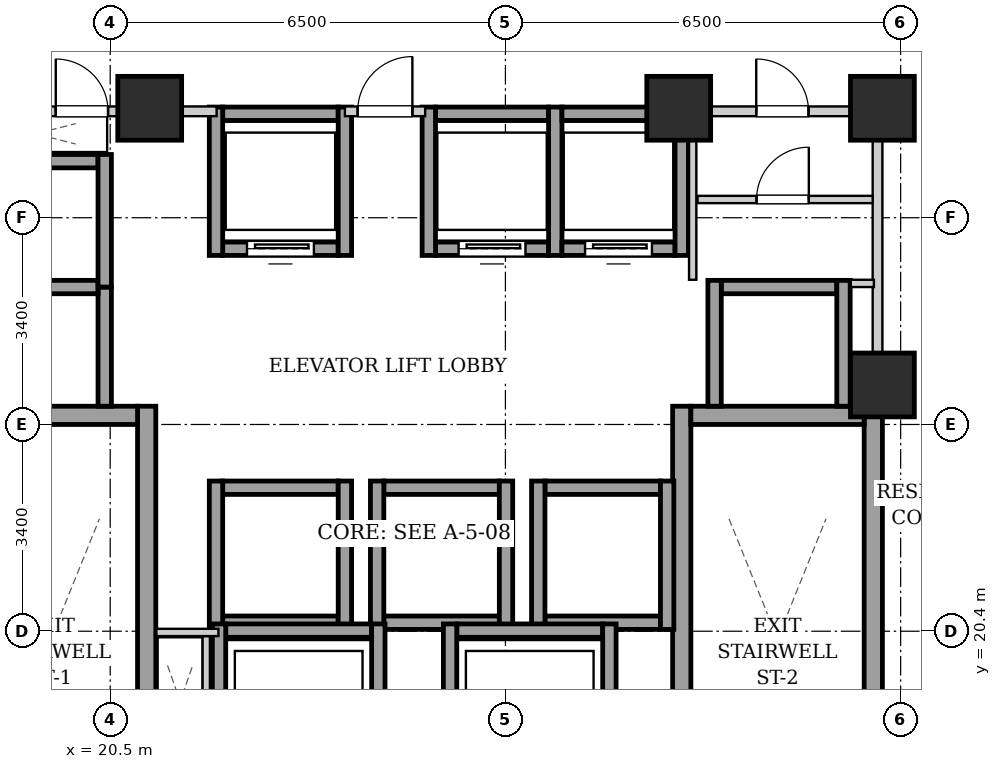
"""IFC4 building model, lengths in metres.
Left out: names, types, materials, properties, quantities, classifications, styles, units other than length and angle.
Written with IfcOpenShell. Run it as: python <this file> out.ifc"""

import sys

from ifc_helpers import new_model, si_unit, direction, frame, frame_2d, origin, origin_2d, place, context, subcontext, project, spatial, rectangle, extrude, element, fill, save


model = new_model("IFC4")
c1 = context("Model", 3, precision=1e-05, world=origin(), true_north=direction((0.0, 1.0)))
c2 = subcontext(c1, "Body", "Model", "MODEL_VIEW")
j1 = project(units=[si_unit("LENGTHUNIT", "METRE"), si_unit("PLANEANGLEUNIT", "RADIAN")], contexts=[c1])
p1 = place(None, origin())
s1 = spatial("IfcSite", under=j1, at=p1, CompositionType="ELEMENT")
p2 = place(p1, origin())
s2 = spatial("IfcBuilding", under=s1, at=p2, CompositionType="ELEMENT")
p3 = place(p2, frame((0.0, 0.0, 97.5)))
s3 = spatial("IfcBuildingStorey", under=s2, at=p3, CompositionType="ELEMENT", Elevation=97.5)
for number, where, z_axis, x_axis in (
    (1, (21.15, 29.0, 0.0), (0.0, 0.0, 1.0), (1.0, 0.0, 0.0)),
    (2, (29.85, 29.0, 0.0), (0.0, 0.0, 1.0), (1.0, 0.0, 0.0)),
    (3, (33.2, 29.0, 0.0), (0.0, 0.0, 1.0), (1.0, 0.0, 0.0)),
    (4, (33.2, 24.45, 0.0), (0.0, 0.0, 1.0), (1.0, 0.0, 0.0)),
):
    element("IfcColumn", number, at=place(p3, frame(where, z_axis=z_axis, x_axis=x_axis)), inside=s3, PredefinedType="COLUMN", context=c2, shape_type="SweptSolid", body=[
        extrude(rectangle(XDim=1.05, YDim=1.05, at=origin_2d()), origin(), (0.0, 0.0, 1.0), 3.2),
    ])
p4 = place(p3, frame((21.1, 15.1, 0.0), z_axis=(0.0, 0.0, 1.0), x_axis=(0.0, 1.0, 0.0)))
e5 = element("IfcWall", 5, at=p4, inside=s3, PredefinedType="SHEAR", context=c2, shape_type="SweptSolid", body=[
    extrude(rectangle(XDim=9.0, YDim=0.3, at=frame_2d((4.5, 0.0))), origin(), (0.0, 0.0, 1.0), 2.94),
])
p5 = place(p3, frame((18.1, 23.95, 0.0), z_axis=(0.0, 0.0, 1.0), x_axis=(1.0, 0.0, 0.0)))
e6 = element("IfcWall", 6, at=p5, inside=s3, PredefinedType="SHEAR", context=c2, shape_type="SweptSolid", body=[
    extrude(rectangle(XDim=2.85, YDim=0.3, at=frame_2d((1.425, 0.0))), origin(), (0.0, 0.0, 1.0), 2.94),
])
for number, where, z_axis, x_axis in (
    (7, (29.9, 15.1, 0.0), (0.0, 0.0, 1.0), (0.0, 1.0, 0.0)),
    (8, (33.05, 15.1, 0.0), (0.0, 0.0, 1.0), (0.0, 1.0, 0.0)),
):
    element("IfcWall", number, at=place(p3, frame(where, z_axis=z_axis, x_axis=x_axis)), inside=s3, PredefinedType="SHEAR", context=c2, shape_type="SweptSolid", body=[
        extrude(rectangle(XDim=9.0, YDim=0.3, at=frame_2d((4.5, 0.0))), origin(), (0.0, 0.0, 1.0), 2.94),
    ])
p6 = place(p3, frame((30.05, 23.95, 0.0), z_axis=(0.0, 0.0, 1.0), x_axis=(1.0, 0.0, 0.0)))
e9 = element("IfcWall", 9, at=p6, inside=s3, PredefinedType="SHEAR", context=c2, shape_type="SweptSolid", body=[
    extrude(rectangle(XDim=2.85, YDim=0.3, at=frame_2d((1.425, 0.0))), origin(), (0.0, 0.0, 1.0), 2.94),
])
p7 = place(p3, frame((22.35, 26.69, 0.0), z_axis=(0.0, 0.0, 1.0), x_axis=(1.0, 0.0, 0.0)))
e10 = element("IfcWall", 10, at=p7, inside=s3, PredefinedType="SHEAR", context=c2, shape_type="SweptSolid", body=[
    extrude(rectangle(XDim=1.9, YDim=0.22, at=frame_2d((0.95, 0.0))), origin(), (0.0, 0.0, 1.0), 2.94),
])
p8 = place(p7, frame((0.4, 0.0, 0.0)))
e11 = element("IfcOpeningElement", 11, at=p8, cuts=e10, PredefinedType="OPENING", context=c2, shape_type="SweptSolid", body=[
    extrude(rectangle(XDim=1.1, YDim=2.15, at=frame_2d((0.55, 1.075))), frame((0.0, 0.12, 0.0), z_axis=(0.0, -1.0, 0.0), x_axis=(1.0, 0.0, 0.0)), (0.0, 0.0, 1.0), 0.24),
])
p9 = place(p3, frame((22.35, 28.91, 0.0), z_axis=(0.0, 0.0, 1.0), x_axis=(1.0, 0.0, 0.0)))
e12 = element("IfcWall", 12, at=p9, inside=s3, PredefinedType="SHEAR", context=c2, shape_type="SweptSolid", body=[
    extrude(rectangle(XDim=1.9, YDim=0.22, at=frame_2d((0.95, 0.0))), origin(), (0.0, 0.0, 1.0), 2.94),
])
for number, where, z_axis, x_axis in (
    (13, (22.24, 26.58, 0.0), (0.0, 0.0, 1.0), (0.0, 1.0, 0.0)),
    (14, (24.36, 26.58, 0.0), (0.0, 0.0, 1.0), (0.0, 1.0, 0.0)),
):
    element("IfcWall", number, at=place(p3, frame(where, z_axis=z_axis, x_axis=x_axis)), inside=s3, PredefinedType="SHEAR", context=c2, shape_type="SweptSolid", body=[
        extrude(rectangle(XDim=2.44, YDim=0.22, at=frame_2d((1.22, 0.0))), origin(), (0.0, 0.0, 1.0), 2.94),
    ])
p10 = place(p3, frame((25.85, 26.69, 0.0), z_axis=(0.0, 0.0, 1.0), x_axis=(1.0, 0.0, 0.0)))
e15 = element("IfcWall", 15, at=p10, inside=s3, PredefinedType="SHEAR", context=c2, shape_type="SweptSolid", body=[
    extrude(rectangle(XDim=1.86, YDim=0.22, at=frame_2d((0.93, 0.0))), origin(), (0.0, 0.0, 1.0), 2.94),
])
p11 = place(p10, frame((0.38, 0.0, 0.0)))
e16 = element("IfcOpeningElement", 16, at=p11, cuts=e15, PredefinedType="OPENING", context=c2, shape_type="SweptSolid", body=[
    extrude(rectangle(XDim=1.1, YDim=2.15, at=frame_2d((0.55, 1.075))), frame((0.0, 0.12, 0.0), z_axis=(0.0, -1.0, 0.0), x_axis=(1.0, 0.0, 0.0)), (0.0, 0.0, 1.0), 0.24),
])
p12 = place(p3, frame((25.85, 28.91, 0.0), z_axis=(0.0, 0.0, 1.0), x_axis=(1.0, 0.0, 0.0)))
e17 = element("IfcWall", 17, at=p12, inside=s3, PredefinedType="SHEAR", context=c2, shape_type="SweptSolid", body=[
    extrude(rectangle(XDim=1.86, YDim=0.22, at=frame_2d((0.93, 0.0))), origin(), (0.0, 0.0, 1.0), 2.94),
])
for number, where, z_axis, x_axis in (
    (18, (25.74, 26.58, 0.0), (0.0, 0.0, 1.0), (0.0, 1.0, 0.0)),
    (19, (27.82, 26.58, 0.0), (0.0, 0.0, 1.0), (0.0, 1.0, 0.0)),
):
    element("IfcWall", number, at=place(p3, frame(where, z_axis=z_axis, x_axis=x_axis)), inside=s3, PredefinedType="SHEAR", context=c2, shape_type="SweptSolid", body=[
        extrude(rectangle(XDim=2.44, YDim=0.22, at=frame_2d((1.22, 0.0))), origin(), (0.0, 0.0, 1.0), 2.94),
    ])
p13 = place(p3, frame((27.93, 26.69, 0.0), z_axis=(0.0, 0.0, 1.0), x_axis=(1.0, 0.0, 0.0)))
e20 = element("IfcWall", 20, at=p13, inside=s3, PredefinedType="SHEAR", context=c2, shape_type="SweptSolid", body=[
    extrude(rectangle(XDim=1.86, YDim=0.22, at=frame_2d((0.93, 0.0))), origin(), (0.0, 0.0, 1.0), 2.94),
])
p14 = place(p13, frame((0.38, 0.0, 0.0)))
e21 = element("IfcOpeningElement", 21, at=p14, cuts=e20, PredefinedType="OPENING", context=c2, shape_type="SweptSolid", body=[
    extrude(rectangle(XDim=1.1, YDim=2.15, at=frame_2d((0.55, 1.075))), frame((0.0, 0.12, 0.0), z_axis=(0.0, -1.0, 0.0), x_axis=(1.0, 0.0, 0.0)), (0.0, 0.0, 1.0), 0.24),
])
p15 = place(p3, frame((27.93, 28.91, 0.0), z_axis=(0.0, 0.0, 1.0), x_axis=(1.0, 0.0, 0.0)))
e22 = element("IfcWall", 22, at=p15, inside=s3, PredefinedType="SHEAR", context=c2, shape_type="SweptSolid", body=[
    extrude(rectangle(XDim=1.86, YDim=0.22, at=frame_2d((0.93, 0.0))), origin(), (0.0, 0.0, 1.0), 2.94),
])
p16 = place(p3, frame((29.9, 26.58, 0.0), z_axis=(0.0, 0.0, 1.0), x_axis=(0.0, 1.0, 0.0)))
e23 = element("IfcWall", 23, at=p16, inside=s3, PredefinedType="SHEAR", context=c2, shape_type="SweptSolid", body=[
    extrude(rectangle(XDim=2.44, YDim=0.22, at=frame_2d((1.22, 0.0))), origin(), (0.0, 0.0, 1.0), 2.94),
])
for number, where, z_axis, x_axis in (
    (24, (22.35, 20.54, 0.0), (0.0, 0.0, 1.0), (1.0, 0.0, 0.0)),
    (25, (22.35, 22.76, 0.0), (0.0, 0.0, 1.0), (1.0, 0.0, 0.0)),
):
    element("IfcWall", number, at=place(p3, frame(where, z_axis=z_axis, x_axis=x_axis)), inside=s3, PredefinedType="SHEAR", context=c2, shape_type="SweptSolid", body=[
        extrude(rectangle(XDim=1.9, YDim=0.22, at=frame_2d((0.95, 0.0))), origin(), (0.0, 0.0, 1.0), 2.94),
    ])
for number, where, z_axis, x_axis in (
    (26, (22.24, 20.43, 0.0), (0.0, 0.0, 1.0), (0.0, 1.0, 0.0)),
    (27, (24.36, 20.43, 0.0), (0.0, 0.0, 1.0), (0.0, 1.0, 0.0)),
):
    element("IfcWall", number, at=place(p3, frame(where, z_axis=z_axis, x_axis=x_axis)), inside=s3, PredefinedType="SHEAR", context=c2, shape_type="SweptSolid", body=[
        extrude(rectangle(XDim=2.44, YDim=0.22, at=frame_2d((1.22, 0.0))), origin(), (0.0, 0.0, 1.0), 2.94),
    ])
for number, where, z_axis, x_axis in (
    (28, (25.0, 20.54, 0.0), (0.0, 0.0, 1.0), (1.0, 0.0, 0.0)),
    (29, (25.0, 22.76, 0.0), (0.0, 0.0, 1.0), (1.0, 0.0, 0.0)),
):
    element("IfcWall", number, at=place(p3, frame(where, z_axis=z_axis, x_axis=x_axis)), inside=s3, PredefinedType="SHEAR", context=c2, shape_type="SweptSolid", body=[
        extrude(rectangle(XDim=1.9, YDim=0.22, at=frame_2d((0.95, 0.0))), origin(), (0.0, 0.0, 1.0), 2.94),
    ])
for number, where, z_axis, x_axis in (
    (30, (24.89, 20.43, 0.0), (0.0, 0.0, 1.0), (0.0, 1.0, 0.0)),
    (31, (27.01, 20.43, 0.0), (0.0, 0.0, 1.0), (0.0, 1.0, 0.0)),
):
    element("IfcWall", number, at=place(p3, frame(where, z_axis=z_axis, x_axis=x_axis)), inside=s3, PredefinedType="SHEAR", context=c2, shape_type="SweptSolid", body=[
        extrude(rectangle(XDim=2.44, YDim=0.22, at=frame_2d((1.22, 0.0))), origin(), (0.0, 0.0, 1.0), 2.94),
    ])
for number, where, z_axis, x_axis in (
    (32, (27.65, 20.54, 0.0), (0.0, 0.0, 1.0), (1.0, 0.0, 0.0)),
    (33, (27.65, 22.76, 0.0), (0.0, 0.0, 1.0), (1.0, 0.0, 0.0)),
):
    element("IfcWall", number, at=place(p3, frame(where, z_axis=z_axis, x_axis=x_axis)), inside=s3, PredefinedType="SHEAR", context=c2, shape_type="SweptSolid", body=[
        extrude(rectangle(XDim=1.9, YDim=0.22, at=frame_2d((0.95, 0.0))), origin(), (0.0, 0.0, 1.0), 2.94),
    ])
for number, where, z_axis, x_axis in (
    (34, (27.54, 20.43, 0.0), (0.0, 0.0, 1.0), (0.0, 1.0, 0.0)),
    (35, (29.66, 20.43, 0.0), (0.0, 0.0, 1.0), (0.0, 1.0, 0.0)),
):
    element("IfcWall", number, at=place(p3, frame(where, z_axis=z_axis, x_axis=x_axis)), inside=s3, PredefinedType="SHEAR", context=c2, shape_type="SweptSolid", body=[
        extrude(rectangle(XDim=2.44, YDim=0.22, at=frame_2d((1.22, 0.0))), origin(), (0.0, 0.0, 1.0), 2.94),
    ])
p17 = place(p3, frame((20.41, 24.1, 0.0), z_axis=(0.0, 0.0, 1.0), x_axis=(0.0, 1.0, 0.0)))
e36 = element("IfcWall", 36, at=p17, inside=s3, PredefinedType="SHEAR", context=c2, shape_type="SweptSolid", body=[
    extrude(rectangle(XDim=1.96, YDim=0.22, at=frame_2d((0.98, 0.0))), origin(), (0.0, 0.0, 1.0), 2.94),
])
for number, where, z_axis, x_axis in (
    (37, (18.4, 26.06, 0.0), (0.0, 0.0, 1.0), (1.0, 0.0, 0.0)),
    (38, (18.4, 28.13, 0.0), (0.0, 0.0, 1.0), (1.0, 0.0, 0.0)),
):
    element("IfcWall", number, at=place(p3, frame(where, z_axis=z_axis, x_axis=x_axis)), inside=s3, PredefinedType="SHEAR", context=c2, shape_type="SweptSolid", body=[
        extrude(rectangle(XDim=1.9, YDim=0.22, at=frame_2d((0.95, 0.0))), origin(), (0.0, 0.0, 1.0), 2.94),
    ])
p18 = place(p3, frame((20.41, 26.06, 0.0), z_axis=(0.0, 0.0, 1.0), x_axis=(0.0, 1.0, 0.0)))
e39 = element("IfcWall", 39, at=p18, inside=s3, PredefinedType="SHEAR", context=c2, shape_type="SweptSolid", body=[
    extrude(rectangle(XDim=2.18, YDim=0.22, at=frame_2d((1.09, 0.0))), origin(), (0.0, 0.0, 1.0), 2.94),
])
p19 = place(p3, frame((30.55, 26.06, 0.0), z_axis=(0.0, 0.0, 1.0), x_axis=(1.0, 0.0, 0.0)))
e40 = element("IfcWall", 40, at=p19, inside=s3, PredefinedType="SHEAR", context=c2, shape_type="SweptSolid", body=[
    extrude(rectangle(XDim=1.9, YDim=0.22, at=frame_2d((0.95, 0.0))), origin(), (0.0, 0.0, 1.0), 2.94),
])
for number, where, z_axis, x_axis in (
    (41, (30.44, 24.1, 0.0), (0.0, 0.0, 1.0), (0.0, 1.0, 0.0)),
    (42, (32.56, 24.1, 0.0), (0.0, 0.0, 1.0), (0.0, 1.0, 0.0)),
):
    element("IfcWall", number, at=place(p3, frame(where, z_axis=z_axis, x_axis=x_axis)), inside=s3, PredefinedType="SHEAR", context=c2, shape_type="SweptSolid", body=[
        extrude(rectangle(XDim=2.07, YDim=0.22, at=frame_2d((1.035, 0.0))), origin(), (0.0, 0.0, 1.0), 2.94),
    ])
p20 = place(p3, frame((22.4, 20.41, 0.0), z_axis=(0.0, 0.0, 1.0), x_axis=(1.0, 0.0, 0.0)))
e43 = element("IfcWall", 43, at=p20, inside=s3, PredefinedType="SHEAR", context=c2, shape_type="SweptSolid", body=[
    extrude(rectangle(XDim=2.4, YDim=0.22, at=frame_2d((1.2, 0.0))), origin(), (0.0, 0.0, 1.0), 2.94),
])
for number, where, z_axis, x_axis in (
    (44, (22.29, 17.98, 0.0), (0.0, 0.0, 1.0), (0.0, 1.0, 0.0)),
    (45, (24.91, 17.98, 0.0), (0.0, 0.0, 1.0), (0.0, 1.0, 0.0)),
):
    element("IfcWall", number, at=place(p3, frame(where, z_axis=z_axis, x_axis=x_axis)), inside=s3, PredefinedType="SHEAR", context=c2, shape_type="SweptSolid", body=[
        extrude(rectangle(XDim=2.54, YDim=0.22, at=frame_2d((1.27, 0.0))), origin(), (0.0, 0.0, 1.0), 2.94),
    ])
p21 = place(p3, frame((26.2, 20.41, 0.0), z_axis=(0.0, 0.0, 1.0), x_axis=(1.0, 0.0, 0.0)))
e46 = element("IfcWall", 46, at=p21, inside=s3, PredefinedType="SHEAR", context=c2, shape_type="SweptSolid", body=[
    extrude(rectangle(XDim=2.4, YDim=0.22, at=frame_2d((1.2, 0.0))), origin(), (0.0, 0.0, 1.0), 2.94),
])
for number, where, z_axis, x_axis in (
    (47, (26.09, 17.98, 0.0), (0.0, 0.0, 1.0), (0.0, 1.0, 0.0)),
    (48, (28.71, 17.98, 0.0), (0.0, 0.0, 1.0), (0.0, 1.0, 0.0)),
):
    element("IfcWall", number, at=place(p3, frame(where, z_axis=z_axis, x_axis=x_axis)), inside=s3, PredefinedType="SHEAR", context=c2, shape_type="SweptSolid", body=[
        extrude(rectangle(XDim=2.54, YDim=0.22, at=frame_2d((1.27, 0.0))), origin(), (0.0, 0.0, 1.0), 2.94),
    ])
p22 = place(p3, frame((33.12, 24.12, 0.0), z_axis=(0.0, 0.0, 1.0), x_axis=(0.0, 1.0, 0.0)))
e49 = element("IfcWall", 49, at=p22, inside=s3, PredefinedType="PARTITIONING", context=c2, shape_type="SweptSolid", body=[
    extrude(rectangle(XDim=4.76, YDim=0.16, at=frame_2d((2.38, 0.0))), origin(), (0.0, 0.0, 1.0), 2.275),
])
p23 = place(p3, frame((24.36, 28.95, 0.0), z_axis=(0.0, 0.0, 1.0), x_axis=(1.0, 0.0, 0.0)))
e50 = element("IfcWall", 50, at=p23, inside=s3, PredefinedType="PARTITIONING", context=c2, shape_type="SweptSolid", body=[
    extrude(rectangle(XDim=1.32, YDim=0.16, at=frame_2d((0.66, 0.0))), origin(), (0.0, 0.0, 1.0), 2.313),
])
p24 = place(p23, frame((0.21, 0.0, 0.0)))
e51 = element("IfcOpeningElement", 51, at=p24, cuts=e50, PredefinedType="OPENING", context=c2, shape_type="SweptSolid", body=[
    extrude(rectangle(XDim=0.9, YDim=2.05, at=frame_2d((0.45, 1.025))), frame((0.0, 0.09, 0.0), z_axis=(0.0, -1.0, 0.0), x_axis=(1.0, 0.0, 0.0)), (0.0, 0.0, 1.0), 0.18),
])
p25 = place(p3, frame((17.96, 28.95, 0.0), z_axis=(0.0, 0.0, 1.0), x_axis=(1.0, 0.0, 0.0)))
e52 = element("IfcWall", 52, at=p25, inside=s3, PredefinedType="PARTITIONING", context=c2, shape_type="SweptSolid", body=[
    extrude(rectangle(XDim=4.29, YDim=0.16, at=frame_2d((2.145, 0.0))), origin(), (0.0, 0.0, 1.0), 2.313),
])
p26 = place(p25, frame((1.645, 0.0, 0.0)))
e53 = element("IfcOpeningElement", 53, at=p26, cuts=e52, PredefinedType="OPENING", context=c2, shape_type="SweptSolid", body=[
    extrude(rectangle(XDim=0.86, YDim=2.05, at=frame_2d((0.43, 1.025))), frame((0.0, 0.09, 0.0), z_axis=(0.0, -1.0, 0.0), x_axis=(1.0, 0.0, 0.0)), (0.0, 0.0, 1.0), 0.18),
])
p27 = place(p3, frame((22.08, 18.2, 0.0), z_axis=(0.0, 0.0, 1.0), x_axis=(0.0, 1.0, 0.0)))
e54 = element("IfcWall", 54, at=p27, inside=s3, PredefinedType="PARTITIONING", context=c2, shape_type="SweptSolid", body=[
    extrude(rectangle(XDim=2.12, YDim=0.12, at=frame_2d((1.06, 0.0))), origin(), (0.0, 0.0, 1.0), 2.94),
])
p28 = place(p3, frame((22.28, 20.38, 0.0), z_axis=(0.0, 0.0, 1.0), x_axis=(-1.0, 0.0, 0.0)))
e55 = element("IfcWall", 55, at=p28, inside=s3, PredefinedType="PARTITIONING", context=c2, shape_type="SweptSolid", body=[
    extrude(rectangle(XDim=1.02, YDim=0.12, at=frame_2d((0.51, 0.0))), origin(), (0.0, 0.0, 1.0), 2.94),
])
p29 = place(p3, frame((30.08, 26.18, 0.0), z_axis=(0.0, 0.0, 1.0), x_axis=(0.0, 1.0, 0.0)))
e56 = element("IfcWall", 56, at=p29, inside=s3, PredefinedType="PARTITIONING", context=c2, shape_type="SweptSolid", body=[
    extrude(rectangle(XDim=2.68, YDim=0.12, at=frame_2d((1.34, 0.0))), origin(), (0.0, 0.0, 1.0), 2.94),
])
p30 = place(p3, frame((32.68, 26.12, 0.0), z_axis=(0.0, 0.0, 1.0), x_axis=(1.0, 0.0, 0.0)))
e57 = element("IfcWall", 57, at=p30, inside=s3, PredefinedType="PARTITIONING", context=c2, shape_type="SweptSolid", body=[
    extrude(rectangle(XDim=0.38, YDim=0.12, at=frame_2d((0.19, 0.0))), origin(), (0.0, 0.0, 1.0), 2.94),
])
p31 = place(p3, frame((30.16, 27.5, 0.0), z_axis=(0.0, 0.0, 1.0), x_axis=(1.0, 0.0, 0.0)))
e58 = element("IfcWall", 58, at=p31, inside=s3, PredefinedType="PARTITIONING", context=c2, shape_type="SweptSolid", body=[
    extrude(rectangle(XDim=2.88, YDim=0.12, at=frame_2d((1.44, 0.0))), origin(), (0.0, 0.0, 1.0), 2.94),
])
p32 = place(p31, frame((0.97, 0.0, 0.0)))
e59 = element("IfcOpeningElement", 59, at=p32, cuts=e58, PredefinedType="OPENING", context=c2, shape_type="SweptSolid", body=[
    extrude(rectangle(XDim=0.86, YDim=2.05, at=frame_2d((0.43, 1.025))), frame((0.0, 0.07, 0.0), z_axis=(0.0, -1.0, 0.0), x_axis=(1.0, 0.0, 0.0)), (0.0, 0.0, 1.0), 0.14),
])
p33 = place(p3, frame((30.08, 28.95, 0.0), z_axis=(0.0, 0.0, 1.0), x_axis=(1.0, 0.0, 0.0)))
e60 = element("IfcWall", 60, at=p33, inside=s3, PredefinedType="PARTITIONING", context=c2, shape_type="SweptSolid", body=[
    extrude(rectangle(XDim=2.96, YDim=0.16, at=frame_2d((1.48, 0.0))), origin(), (0.0, 0.0, 1.0), 2.94),
])
p34 = place(p33, frame((1.045, 0.0, 0.0)))
e61 = element("IfcOpeningElement", 61, at=p34, cuts=e60, PredefinedType="OPENING", context=c2, shape_type="SweptSolid", body=[
    extrude(rectangle(XDim=0.86, YDim=2.05, at=frame_2d((0.43, 1.025))), frame((0.0, 0.09, 0.0), z_axis=(0.0, -1.0, 0.0), x_axis=(1.0, 0.0, 0.0)), (0.0, 0.0, 1.0), 0.18),
])
p35 = place(p8, origin())
e62 = element("IfcDoor", 62, at=p35, inside=s3, OperationType="SLIDING_TO_LEFT", PredefinedType="DOOR", context=c2, shape_type="SweptSolid", body=[
    extrude(rectangle(XDim=1.1, YDim=2.15, at=frame_2d((0.55, 1.075))), frame((0.0, 0.025, 0.0), z_axis=(0.0, -1.0, 0.0), x_axis=(1.0, 0.0, 0.0)), (0.0, 0.0, 1.0), 0.05),
])
fill(e11, e62)
p36 = place(p11, origin())
e63 = element("IfcDoor", 63, at=p36, inside=s3, OperationType="SLIDING_TO_LEFT", PredefinedType="DOOR", context=c2, shape_type="SweptSolid", body=[
    extrude(rectangle(XDim=1.1, YDim=2.15, at=frame_2d((0.55, 1.075))), frame((0.0, 0.025, 0.0), z_axis=(0.0, -1.0, 0.0), x_axis=(1.0, 0.0, 0.0)), (0.0, 0.0, 1.0), 0.05),
])
fill(e16, e63)
p37 = place(p14, origin())
e64 = element("IfcDoor", 64, at=p37, inside=s3, OperationType="SLIDING_TO_LEFT", PredefinedType="DOOR", context=c2, shape_type="SweptSolid", body=[
    extrude(rectangle(XDim=1.1, YDim=2.15, at=frame_2d((0.55, 1.075))), frame((0.0, 0.025, 0.0), z_axis=(0.0, -1.0, 0.0), x_axis=(1.0, 0.0, 0.0)), (0.0, 0.0, 1.0), 0.05),
])
fill(e21, e64)
p38 = place(p24, origin())
e65 = element("IfcDoor", 65, at=p38, inside=s3, OperationType="SINGLE_SWING_RIGHT", PredefinedType="DOOR", context=c2, shape_type="SweptSolid", body=[
    extrude(rectangle(XDim=0.9, YDim=2.05, at=frame_2d((0.45, 1.025))), frame((0.0, 0.025, 0.0), z_axis=(0.0, -1.0, 0.0), x_axis=(1.0, 0.0, 0.0)), (0.0, 0.0, 1.0), 0.05),
])
fill(e51, e65)
p39 = place(p26, origin())
e66 = element("IfcDoor", 66, at=p39, inside=s3, OperationType="SINGLE_SWING_LEFT", PredefinedType="DOOR", context=c2, shape_type="SweptSolid", body=[
    extrude(rectangle(XDim=0.86, YDim=2.05, at=frame_2d((0.43, 1.025))), frame((0.0, 0.025, 0.0), z_axis=(0.0, -1.0, 0.0), x_axis=(1.0, 0.0, 0.0)), (0.0, 0.0, 1.0), 0.05),
])
fill(e53, e66)
p40 = place(p32, origin())
e67 = element("IfcDoor", 67, at=p40, inside=s3, OperationType="SINGLE_SWING_RIGHT", PredefinedType="DOOR", context=c2, shape_type="SweptSolid", body=[
    extrude(rectangle(XDim=0.86, YDim=2.05, at=frame_2d((0.43, 1.025))), frame((0.0, 0.025, 0.0), z_axis=(0.0, -1.0, 0.0), x_axis=(1.0, 0.0, 0.0)), (0.0, 0.0, 1.0), 0.05),
])
fill(e59, e67)
p41 = place(p34, origin())
e68 = element("IfcDoor", 68, at=p41, inside=s3, OperationType="SINGLE_SWING_LEFT", PredefinedType="DOOR", context=c2, shape_type="SweptSolid", body=[
    extrude(rectangle(XDim=0.86, YDim=2.05, at=frame_2d((0.43, 1.025))), frame((0.0, 0.025, 0.0), z_axis=(0.0, -1.0, 0.0), x_axis=(1.0, 0.0, 0.0)), (0.0, 0.0, 1.0), 0.05),
])
fill(e61, e68)
save(model, sys.argv[1])
